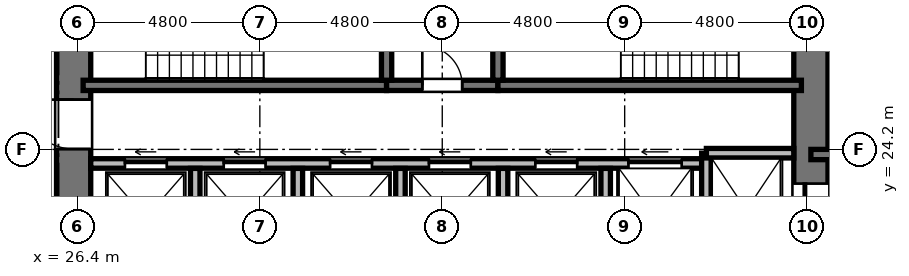
"""IFC4 building model, lengths in metres.
Left out: names, types, materials, properties, quantities, classifications, styles, units other than length and angle.
Written with IfcOpenShell. Run it as: python <this file> out.ifc"""

import sys

from ifc_helpers import new_model, si_unit, direction, frame, frame_2d, origin, place, context, subcontext, project, spatial, rectangle, extrude, element, fill, save


model = new_model("IFC4")
c1 = context("Model", 3, precision=1e-05, world=origin(), true_north=direction((0.0, 1.0)))
c2 = subcontext(c1, "Body", "Model", "MODEL_VIEW")
j1 = project(units=[si_unit("LENGTHUNIT", "METRE"), si_unit("PLANEANGLEUNIT", "RADIAN")], contexts=[c1])
p1 = place(None, origin())
s1 = spatial("IfcSite", under=j1, at=p1, CompositionType="ELEMENT")
p2 = place(p1, origin())
s2 = spatial("IfcBuilding", under=s1, at=p2, CompositionType="ELEMENT")
p3 = place(p2, frame((0.0, 0.0, 32.496)))
s3 = spatial("IfcBuildingStorey", under=s2, at=p3, CompositionType="ELEMENT", Elevation=32.496)
p4 = place(p3, frame((26.3, 20.95, 0.0), z_axis=(0.0, 0.0, 1.0), x_axis=(0.0, 1.0, 0.0)))
e1 = element("IfcWall", 1, at=p4, inside=s3, PredefinedType="SHEAR", context=c2, shape_type="SweptSolid", body=[
    extrude(rectangle(XDim=14.1, YDim=0.9, at=frame_2d((7.05, 0.0))), origin(), (0.0, 0.0, 1.0), 3.648),
])
p5 = place(p4, frame((6.5, 0.0, 0.0)))
e2 = element("IfcOpeningElement", 2, at=p5, cuts=e1, PredefinedType="OPENING", context=c2, shape_type="SweptSolid", body=[
    extrude(rectangle(XDim=1.2, YDim=2.15, at=frame_2d((0.6, 1.075))), frame((0.0, 0.46, 0.0), z_axis=(0.0, -1.0, 0.0), x_axis=(1.0, 0.0, 0.0)), (0.0, 0.0, 1.0), 0.92),
])
p6 = place(p4, frame((9.6, 0.0, 0.0)))
e3 = element("IfcOpeningElement", 3, at=p6, cuts=e1, PredefinedType="OPENING", context=c2, shape_type="SweptSolid", body=[
    extrude(rectangle(XDim=1.3, YDim=2.2, at=frame_2d((0.65, 1.1))), frame((0.0, 0.46, 0.0), z_axis=(0.0, -1.0, 0.0), x_axis=(1.0, 0.0, 0.0)), (0.0, 0.0, 1.0), 0.92),
])
p7 = place(p4, frame((3.26, 0.0, 0.0)))
e4 = element("IfcOpeningElement", 4, at=p7, cuts=e1, PredefinedType="OPENING", context=c2, shape_type="SweptSolid", body=[
    extrude(rectangle(XDim=1.3, YDim=2.2, at=frame_2d((0.65, 1.1))), frame((0.0, 0.46, 0.0), z_axis=(0.0, -1.0, 0.0), x_axis=(1.0, 0.0, 0.0)), (0.0, 0.0, 1.0), 0.92),
])
p8 = place(p3, frame((45.7, 20.95, 0.0), z_axis=(0.0, 0.0, 1.0), x_axis=(0.0, 1.0, 0.0)))
e5 = element("IfcWall", 5, at=p8, inside=s3, PredefinedType="SHEAR", context=c2, shape_type="SweptSolid", body=[
    extrude(rectangle(XDim=14.1, YDim=0.9, at=frame_2d((7.05, 0.0))), origin(), (0.0, 0.0, 1.0), 3.648),
])
p9 = place(p8, frame((11.75, 0.0, 0.0)))
e6 = element("IfcOpeningElement", 6, at=p9, cuts=e5, PredefinedType="OPENING", context=c2, shape_type="SweptSolid", body=[
    extrude(rectangle(XDim=1.4, YDim=2.3, at=frame_2d((0.7, 1.15))), frame((0.0, 0.46, 0.0), z_axis=(0.0, -1.0, 0.0), x_axis=(1.0, 0.0, 0.0)), (0.0, 0.0, 1.0), 0.92),
])
p10 = place(p8, frame((0.95, 0.0, 0.0)))
e7 = element("IfcOpeningElement", 7, at=p10, cuts=e5, PredefinedType="OPENING", context=c2, shape_type="SweptSolid", body=[
    extrude(rectangle(XDim=1.4, YDim=2.3, at=frame_2d((0.7, 1.15))), frame((0.0, 0.46, 0.0), z_axis=(0.0, -1.0, 0.0), x_axis=(1.0, 0.0, 0.0)), (0.0, 0.0, 1.0), 0.92),
])
p11 = place(p3, frame((26.55, 25.885, 0.0), z_axis=(0.0, 0.0, 1.0), x_axis=(1.0, 0.0, 0.0)))
e8 = element("IfcWall", 8, at=p11, inside=s3, PredefinedType="SHEAR", context=c2, shape_type="SweptSolid", body=[
    extrude(rectangle(XDim=7.985, YDim=0.27, at=frame_2d((3.992, 0.0))), origin(), (0.0, 0.0, 1.0), 3.648),
])
p12 = place(p3, frame((34.535, 25.885, 0.0), z_axis=(0.0, 0.0, 1.0), x_axis=(1.0, 0.0, 0.0)))
e9 = element("IfcWall", 9, at=p12, inside=s3, PredefinedType="SHEAR", context=c2, shape_type="SweptSolid", body=[
    extrude(rectangle(XDim=2.93, YDim=0.27, at=frame_2d((1.465, 0.0))), origin(), (0.0, 0.0, 1.0), 3.648),
])
p13 = place(p12, frame((0.94, 0.0, 0.0)))
e10 = element("IfcOpeningElement", 10, at=p13, cuts=e9, PredefinedType="OPENING", context=c2, shape_type="SweptSolid", body=[
    extrude(rectangle(XDim=1.05, YDim=2.15, at=frame_2d((0.525, 1.075))), frame((0.0, 0.145, 0.0), z_axis=(0.0, -1.0, 0.0), x_axis=(1.0, 0.0, 0.0)), (0.0, 0.0, 1.0), 0.29),
])
p14 = place(p3, frame((37.465, 25.885, 0.0), z_axis=(0.0, 0.0, 1.0), x_axis=(1.0, 0.0, 0.0)))
e11 = element("IfcWall", 11, at=p14, inside=s3, PredefinedType="SHEAR", context=c2, shape_type="SweptSolid", body=[
    extrude(rectangle(XDim=7.985, YDim=0.27, at=frame_2d((3.992, 0.0))), origin(), (0.0, 0.0, 1.0), 3.648),
])
for number, where, z_axis, x_axis in (
    (12, (34.535, 26.02, 0.0), (0.0, 0.0, 1.0), (0.0, 1.0, 0.0)),
    (13, (37.465, 26.02, 0.0), (0.0, 0.0, 1.0), (0.0, 1.0, 0.0)),
):
    element("IfcWall", number, at=place(p3, frame(where, z_axis=z_axis, x_axis=x_axis)), inside=s3, PredefinedType="SHEAR", context=c2, shape_type="SweptSolid", body=[
        extrude(rectangle(XDim=4.08, YDim=0.27, at=frame_2d((2.04, 0.0))), origin(), (0.0, 0.0, 1.0), 3.648),
    ])
p15 = place(p3, frame((26.75, 23.83, 0.0), z_axis=(0.0, 0.0, 1.0), x_axis=(1.0, 0.0, 0.0)))
e14 = element("IfcWall", 14, at=p15, inside=s3, PredefinedType="SOLIDWALL", context=c2, shape_type="SweptSolid", body=[
    extrude(rectangle(XDim=16.2, YDim=0.25, at=frame_2d((8.1, 0.0))), origin(), (0.0, 0.0, 1.0), 3.428),
])
p16 = place(p15, frame((0.9, 0.0, 0.0)))
e15 = element("IfcOpeningElement", 15, at=p16, cuts=e14, PredefinedType="OPENING", context=c2, shape_type="SweptSolid", body=[
    extrude(rectangle(XDim=1.1, YDim=2.2, at=frame_2d((0.55, 1.1))), frame((0.0, 0.135, 0.0), z_axis=(0.0, -1.0, 0.0), x_axis=(1.0, 0.0, 0.0)), (0.0, 0.0, 1.0), 0.27),
])
p17 = place(p15, frame((3.5, 0.0, 0.0)))
e16 = element("IfcOpeningElement", 16, at=p17, cuts=e14, PredefinedType="OPENING", context=c2, shape_type="SweptSolid", body=[
    extrude(rectangle(XDim=1.1, YDim=2.2, at=frame_2d((0.55, 1.1))), frame((0.0, 0.135, 0.0), z_axis=(0.0, -1.0, 0.0), x_axis=(1.0, 0.0, 0.0)), (0.0, 0.0, 1.0), 0.27),
])
p18 = place(p15, frame((6.3, 0.0, 0.0)))
e17 = element("IfcOpeningElement", 17, at=p18, cuts=e14, PredefinedType="OPENING", context=c2, shape_type="SweptSolid", body=[
    extrude(rectangle(XDim=1.1, YDim=2.2, at=frame_2d((0.55, 1.1))), frame((0.0, 0.135, 0.0), z_axis=(0.0, -1.0, 0.0), x_axis=(1.0, 0.0, 0.0)), (0.0, 0.0, 1.0), 0.27),
])
p19 = place(p15, frame((8.9, 0.0, 0.0)))
e18 = element("IfcOpeningElement", 18, at=p19, cuts=e14, PredefinedType="OPENING", context=c2, shape_type="SweptSolid", body=[
    extrude(rectangle(XDim=1.1, YDim=2.2, at=frame_2d((0.55, 1.1))), frame((0.0, 0.135, 0.0), z_axis=(0.0, -1.0, 0.0), x_axis=(1.0, 0.0, 0.0)), (0.0, 0.0, 1.0), 0.27),
])
p20 = place(p15, frame((11.7, 0.0, 0.0)))
e19 = element("IfcOpeningElement", 19, at=p20, cuts=e14, PredefinedType="OPENING", context=c2, shape_type="SweptSolid", body=[
    extrude(rectangle(XDim=1.1, YDim=2.2, at=frame_2d((0.55, 1.1))), frame((0.0, 0.135, 0.0), z_axis=(0.0, -1.0, 0.0), x_axis=(1.0, 0.0, 0.0)), (0.0, 0.0, 1.0), 0.27),
])
p21 = place(p15, frame((14.15, 0.0, 0.0)))
e20 = element("IfcOpeningElement", 20, at=p21, cuts=e14, PredefinedType="OPENING", context=c2, shape_type="SweptSolid", body=[
    extrude(rectangle(XDim=1.4, YDim=2.3, at=frame_2d((0.7, 1.15))), frame((0.0, 0.135, 0.0), z_axis=(0.0, -1.0, 0.0), x_axis=(1.0, 0.0, 0.0)), (0.0, 0.0, 1.0), 0.27),
])
p22 = place(p3, frame((42.95, 20.9, 0.0), z_axis=(0.0, 0.0, 1.0), x_axis=(0.0, 1.0, 0.0)))
e21 = element("IfcWall", 21, at=p22, inside=s3, PredefinedType="SOLIDWALL", context=c2, shape_type="SweptSolid", body=[
    extrude(rectangle(XDim=3.2, YDim=0.25, at=frame_2d((1.6, 0.0))), origin(), (0.0, 0.0, 1.0), 3.428),
])
p23 = place(p3, frame((42.95, 24.1, 0.0), z_axis=(0.0, 0.0, 1.0), x_axis=(1.0, 0.0, 0.0)))
e22 = element("IfcWall", 22, at=p23, inside=s3, PredefinedType="SOLIDWALL", context=c2, shape_type="SweptSolid", body=[
    extrude(rectangle(XDim=2.3, YDim=0.25, at=frame_2d((1.15, 0.0))), origin(), (0.0, 0.0, 1.0), 3.428),
])
for number, where, z_axis, x_axis in (
    (23, (29.5, 20.9, 0.0), (0.0, 0.0, 1.0), (0.0, 1.0, 0.0)),
    (24, (32.2, 20.9, 0.0), (0.0, 0.0, 1.0), (0.0, 1.0, 0.0)),
    (25, (34.9, 20.9, 0.0), (0.0, 0.0, 1.0), (0.0, 1.0, 0.0)),
    (26, (37.6, 20.9, 0.0), (0.0, 0.0, 1.0), (0.0, 1.0, 0.0)),
    (27, (40.3, 20.9, 0.0), (0.0, 0.0, 1.0), (0.0, 1.0, 0.0)),
):
    element("IfcWall", number, at=place(p3, frame(where, z_axis=z_axis, x_axis=x_axis)), inside=s3, PredefinedType="SOLIDWALL", context=c2, shape_type="SweptSolid", body=[
        extrude(rectangle(XDim=2.8, YDim=0.25, at=frame_2d((1.4, 0.0))), origin(), (0.0, 0.0, 1.0), 3.428),
    ])
p24 = place(p3, frame((45.7, 24.065, 0.0), z_axis=(0.0, 0.0, 1.0), x_axis=(1.0, 0.0, 0.0)))
e28 = element("IfcWall", 28, at=p24, inside=s3, PredefinedType="SHEAR", context=c2, shape_type="SweptSolid", body=[
    extrude(rectangle(XDim=4.715, YDim=0.27, at=frame_2d((2.357, 0.0))), origin(), (0.0, 0.0, 1.0), 3.648),
])
p25 = place(p13, origin())
e29 = element("IfcDoor", 29, at=p25, inside=s3, OperationType="SINGLE_SWING_LEFT", PredefinedType="DOOR", context=c2, shape_type="SweptSolid", body=[
    extrude(rectangle(XDim=1.05, YDim=2.15, at=frame_2d((0.525, 1.075))), frame((0.0, 0.025, 0.0), z_axis=(0.0, -1.0, 0.0), x_axis=(1.0, 0.0, 0.0)), (0.0, 0.0, 1.0), 0.05),
])
fill(e10, e29)
p26 = place(p7, origin())
e30 = element("IfcDoor", 30, at=p26, inside=s3, OperationType="SINGLE_SWING_RIGHT", PredefinedType="DOOR", context=c2, shape_type="SweptSolid", body=[
    extrude(rectangle(XDim=1.3, YDim=2.2, at=frame_2d((0.65, 1.1))), frame((0.0, 0.025, 0.0), z_axis=(0.0, -1.0, 0.0), x_axis=(1.0, 0.0, 0.0)), (0.0, 0.0, 1.0), 0.05),
])
fill(e4, e30)
p27 = place(p16, origin())
e31 = element("IfcDoor", 31, at=p27, inside=s3, OperationType="SLIDING_TO_LEFT", PredefinedType="DOOR", context=c2, shape_type="SweptSolid", body=[
    extrude(rectangle(XDim=1.1, YDim=2.2, at=frame_2d((0.55, 1.1))), frame((0.0, 0.025, 0.0), z_axis=(0.0, -1.0, 0.0), x_axis=(1.0, 0.0, 0.0)), (0.0, 0.0, 1.0), 0.05),
])
fill(e15, e31)
p28 = place(p17, origin())
e32 = element("IfcDoor", 32, at=p28, inside=s3, OperationType="SLIDING_TO_LEFT", PredefinedType="DOOR", context=c2, shape_type="SweptSolid", body=[
    extrude(rectangle(XDim=1.1, YDim=2.2, at=frame_2d((0.55, 1.1))), frame((0.0, 0.025, 0.0), z_axis=(0.0, -1.0, 0.0), x_axis=(1.0, 0.0, 0.0)), (0.0, 0.0, 1.0), 0.05),
])
fill(e16, e32)
p29 = place(p18, origin())
e33 = element("IfcDoor", 33, at=p29, inside=s3, OperationType="SLIDING_TO_LEFT", PredefinedType="DOOR", context=c2, shape_type="SweptSolid", body=[
    extrude(rectangle(XDim=1.1, YDim=2.2, at=frame_2d((0.55, 1.1))), frame((0.0, 0.025, 0.0), z_axis=(0.0, -1.0, 0.0), x_axis=(1.0, 0.0, 0.0)), (0.0, 0.0, 1.0), 0.05),
])
fill(e17, e33)
p30 = place(p19, origin())
e34 = element("IfcDoor", 34, at=p30, inside=s3, OperationType="SLIDING_TO_LEFT", PredefinedType="DOOR", context=c2, shape_type="SweptSolid", body=[
    extrude(rectangle(XDim=1.1, YDim=2.2, at=frame_2d((0.55, 1.1))), frame((0.0, 0.025, 0.0), z_axis=(0.0, -1.0, 0.0), x_axis=(1.0, 0.0, 0.0)), (0.0, 0.0, 1.0), 0.05),
])
fill(e18, e34)
p31 = place(p20, origin())
e35 = element("IfcDoor", 35, at=p31, inside=s3, OperationType="SLIDING_TO_LEFT", PredefinedType="DOOR", context=c2, shape_type="SweptSolid", body=[
    extrude(rectangle(XDim=1.1, YDim=2.2, at=frame_2d((0.55, 1.1))), frame((0.0, 0.025, 0.0), z_axis=(0.0, -1.0, 0.0), x_axis=(1.0, 0.0, 0.0)), (0.0, 0.0, 1.0), 0.05),
])
fill(e19, e35)
p32 = place(p10, origin())
e36 = element("IfcDoor", 36, at=p32, inside=s3, OperationType="SLIDING_TO_LEFT", PredefinedType="DOOR", context=c2, shape_type="SweptSolid", body=[
    extrude(rectangle(XDim=1.4, YDim=2.3, at=frame_2d((0.7, 1.15))), frame((0.0, 0.025, 0.0), z_axis=(0.0, -1.0, 0.0), x_axis=(1.0, 0.0, 0.0)), (0.0, 0.0, 1.0), 0.05),
])
fill(e7, e36)
p33 = place(p21, origin())
e37 = element("IfcDoor", 37, at=p33, inside=s3, OperationType="SLIDING_TO_LEFT", PredefinedType="DOOR", context=c2, shape_type="SweptSolid", body=[
    extrude(rectangle(XDim=1.4, YDim=2.3, at=frame_2d((0.7, 1.15))), frame((0.0, 0.025, 0.0), z_axis=(0.0, -1.0, 0.0), x_axis=(1.0, 0.0, 0.0)), (0.0, 0.0, 1.0), 0.05),
])
fill(e20, e37)
save(model, sys.argv[1])
